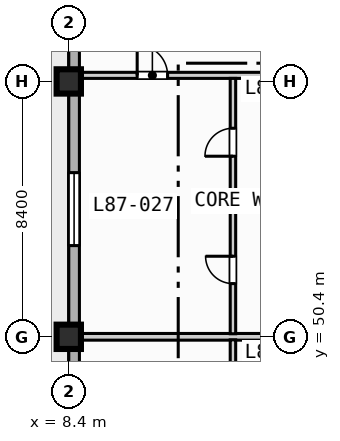
"""IFC4 building model, lengths in metres.
Left out: names, types, materials, properties, quantities, classifications, styles, units other than length and angle.
Written with IfcOpenShell. Run it as: python <this file> out.ifc"""

import sys

from ifc_helpers import new_model, si_unit, direction, frame, frame_2d, origin, origin_2d, place, context, subcontext, project, spatial, rectangle, extrude, element, fill, save


model = new_model("IFC4")
c1 = context("Model", 3, precision=1e-05, world=origin(), true_north=direction((0.0, 1.0)))
c2 = subcontext(c1, "Body", "Model", "MODEL_VIEW")
j1 = project(units=[si_unit("LENGTHUNIT", "METRE"), si_unit("PLANEANGLEUNIT", "RADIAN")], contexts=[c1])
p1 = place(None, origin())
s1 = spatial("IfcSite", under=j1, at=p1, CompositionType="ELEMENT")
p2 = place(p1, origin())
s2 = spatial("IfcBuilding", under=s1, at=p2, CompositionType="ELEMENT")
p3 = place(p2, frame((0.0, 0.0, 351.5)))
s3 = spatial("IfcBuildingStorey", under=s2, at=p3, CompositionType="ELEMENT", Elevation=351.5)
for number, where, z_axis, x_axis in (
    (1, (8.4, 50.4, 0.0), (0.0, 0.0, 1.0), (1.0, 0.0, 0.0)),
    (2, (8.4, 58.8, 0.0), (0.0, 0.0, 1.0), (1.0, 0.0, 0.0)),
):
    element("IfcColumn", number, at=place(p3, frame(where, z_axis=z_axis, x_axis=x_axis)), inside=s3, PredefinedType="COLUMN", context=c2, shape_type="SweptSolid", body=[
        extrude(rectangle(XDim=0.8, YDim=0.8, at=origin_2d()), origin(), (0.0, 0.0, 1.0), 3.9),
    ])
p4 = place(p3, frame((8.575, 11.575, 0.0), z_axis=(0.0, 0.0, 1.0), x_axis=(0.0, 1.0, 0.0)))
e3 = element("IfcWall", 3, at=p4, inside=s3, PredefinedType="STANDARD", context=c2, shape_type="SweptSolid", body=[
    extrude(rectangle(XDim=60.85, YDim=0.35, at=frame_2d((30.425, 0.0))), origin(), (0.0, 0.0, 1.0), 3.67),
])
p5 = place(p4, frame((33.925, 0.0, 0.0)))
e4 = element("IfcOpeningElement", 4, at=p5, cuts=e3, PredefinedType="OPENING", context=c2, shape_type="SweptSolid", body=[
    extrude(rectangle(XDim=1.4, YDim=2.2, at=frame_2d((0.7, 1.1))), frame((0.0, 0.185, 0.0), z_axis=(0.0, -1.0, 0.0), x_axis=(1.0, 0.0, 0.0)), (0.0, 0.0, 1.0), 0.37),
])
p6 = place(p4, frame((16.925, 0.0, 0.85)))
e5 = element("IfcOpeningElement", 5, at=p6, cuts=e3, PredefinedType="OPENING", context=c2, shape_type="SweptSolid", body=[
    extrude(rectangle(XDim=1.8, YDim=1.8, at=frame_2d((0.9, 0.9))), frame((0.0, 0.185, 0.0), z_axis=(0.0, -1.0, 0.0), x_axis=(1.0, 0.0, 0.0)), (0.0, 0.0, 1.0), 0.37),
])
p7 = place(p4, frame((25.025, 0.0, 0.85)))
e6 = element("IfcOpeningElement", 6, at=p7, cuts=e3, PredefinedType="OPENING", context=c2, shape_type="SweptSolid", body=[
    extrude(rectangle(XDim=2.4, YDim=1.95, at=frame_2d((1.2, 0.975))), frame((0.0, 0.185, 0.0), z_axis=(0.0, -1.0, 0.0), x_axis=(1.0, 0.0, 0.0)), (0.0, 0.0, 1.0), 0.37),
])
p8 = place(p4, frame((41.825, 0.0, 0.85)))
e7 = element("IfcOpeningElement", 7, at=p8, cuts=e3, PredefinedType="OPENING", context=c2, shape_type="SweptSolid", body=[
    extrude(rectangle(XDim=2.4, YDim=1.95, at=frame_2d((1.2, 0.975))), frame((0.0, 0.185, 0.0), z_axis=(0.0, -1.0, 0.0), x_axis=(1.0, 0.0, 0.0)), (0.0, 0.0, 1.0), 0.37),
])
p9 = place(p3, frame((8.65, 59.0, 0.0), z_axis=(0.0, 0.0, 1.0), x_axis=(1.0, 0.0, 0.0)))
e8 = element("IfcWall", 8, at=p9, inside=s3, PredefinedType="PARTITIONING", context=c2, shape_type="SweptSolid", body=[
    extrude(rectangle(XDim=7.95, YDim=0.2, at=frame_2d((3.975, 0.0))), origin(), (0.0, 0.0, 1.0), 3.127),
])
p10 = place(p9, frame((2.0, 0.0, 0.0)))
e9 = element("IfcOpeningElement", 9, at=p10, cuts=e8, PredefinedType="OPENING", context=c2, shape_type="SweptSolid", body=[
    extrude(rectangle(XDim=1.0, YDim=2.15, at=frame_2d((0.5, 1.075))), frame((0.0, 0.11, 0.0), z_axis=(0.0, -1.0, 0.0), x_axis=(1.0, 0.0, 0.0)), (0.0, 0.0, 1.0), 0.22),
])
p11 = place(p3, frame((8.65, 50.4, 0.0), z_axis=(0.0, 0.0, 1.0), x_axis=(1.0, 0.0, 0.0)))
e10 = element("IfcWall", 10, at=p11, inside=s3, PredefinedType="PARTITIONING", context=c2, shape_type="SweptSolid", body=[
    extrude(rectangle(XDim=7.95, YDim=0.22, at=frame_2d((3.975, 0.0))), origin(), (0.0, 0.0, 1.0), 3.07),
])
p12 = place(p3, frame((13.8, 41.7, 0.0), z_axis=(0.0, 0.0, 1.0), x_axis=(0.0, 1.0, 0.0)))
e11 = element("IfcWall", 11, at=p12, inside=s3, PredefinedType="PLUMBINGWALL", context=c2, shape_type="SweptSolid", body=[
    extrude(rectangle(XDim=8.6, YDim=0.18, at=frame_2d((4.3, 0.0))), origin(), (0.0, 0.0, 1.0), 3.67),
])
p13 = place(p12, frame((1.7, 0.0, 0.0)))
e12 = element("IfcOpeningElement", 12, at=p13, cuts=e11, PredefinedType="OPENING", context=c2, shape_type="SweptSolid", body=[
    extrude(rectangle(XDim=0.9, YDim=2.1, at=frame_2d((0.45, 1.05))), frame((0.0, 0.1, 0.0), z_axis=(0.0, -1.0, 0.0), x_axis=(1.0, 0.0, 0.0)), (0.0, 0.0, 1.0), 0.2),
])
p14 = place(p12, frame((5.99, 0.0, 0.0)))
e13 = element("IfcOpeningElement", 13, at=p14, cuts=e11, PredefinedType="OPENING", context=c2, shape_type="SweptSolid", body=[
    extrude(rectangle(XDim=0.92, YDim=2.1, at=frame_2d((0.46, 1.05))), frame((0.0, 0.1, 0.0), z_axis=(0.0, -1.0, 0.0), x_axis=(1.0, 0.0, 0.0)), (0.0, 0.0, 1.0), 0.2),
])
p15 = place(p3, frame((13.8, 50.5, 0.0), z_axis=(0.0, 0.0, 1.0), x_axis=(0.0, 1.0, 0.0)))
e14 = element("IfcWall", 14, at=p15, inside=s3, PredefinedType="PLUMBINGWALL", context=c2, shape_type="SweptSolid", body=[
    extrude(rectangle(XDim=8.4, YDim=0.18, at=frame_2d((4.2, 0.0))), origin(), (0.0, 0.0, 1.0), 3.67),
])
p16 = place(p15, frame((1.65, 0.0, 0.0)))
e15 = element("IfcOpeningElement", 15, at=p16, cuts=e14, PredefinedType="OPENING", context=c2, shape_type="SweptSolid", body=[
    extrude(rectangle(XDim=0.9, YDim=2.1, at=frame_2d((0.45, 1.05))), frame((0.0, 0.1, 0.0), z_axis=(0.0, -1.0, 0.0), x_axis=(1.0, 0.0, 0.0)), (0.0, 0.0, 1.0), 0.2),
])
p17 = place(p15, frame((5.84, 0.0, 0.0)))
e16 = element("IfcOpeningElement", 16, at=p17, cuts=e14, PredefinedType="OPENING", context=c2, shape_type="SweptSolid", body=[
    extrude(rectangle(XDim=0.92, YDim=2.1, at=frame_2d((0.46, 1.05))), frame((0.0, 0.1, 0.0), z_axis=(0.0, -1.0, 0.0), x_axis=(1.0, 0.0, 0.0)), (0.0, 0.0, 1.0), 0.2),
])
p18 = place(p3, frame((13.8, 54.7, 0.0), z_axis=(0.0, 0.0, 1.0), x_axis=(1.0, 0.0, 0.0)))
e17 = element("IfcWall", 17, at=p18, inside=s3, PredefinedType="PLUMBINGWALL", context=c2, shape_type="SweptSolid", body=[
    extrude(rectangle(XDim=2.8, YDim=0.18, at=frame_2d((1.4, 0.0))), origin(), (0.0, 0.0, 1.0), 3.67),
])
p19 = place(p8, origin())
e18 = element("IfcWindow", 18, at=p19, inside=s3, PartitioningType="SINGLE_PANEL", PredefinedType="WINDOW", context=c2, shape_type="SweptSolid", body=[
    extrude(rectangle(XDim=2.4, YDim=1.95, at=frame_2d((1.2, 0.975))), frame((0.0, 0.03, 0.0), z_axis=(0.0, -1.0, 0.0), x_axis=(1.0, 0.0, 0.0)), (0.0, 0.0, 1.0), 0.06),
])
fill(e7, e18)
p20 = place(p10, origin())
e19 = element("IfcDoor", 19, at=p20, inside=s3, OperationType="SINGLE_SWING_LEFT", PredefinedType="DOOR", context=c2, shape_type="SweptSolid", body=[
    extrude(rectangle(XDim=1.0, YDim=2.15, at=frame_2d((0.5, 1.075))), frame((0.0, 0.025, 0.0), z_axis=(0.0, -1.0, 0.0), x_axis=(1.0, 0.0, 0.0)), (0.0, 0.0, 1.0), 0.05),
])
fill(e9, e19)
p21 = place(p16, origin())
e20 = element("IfcDoor", 20, at=p21, inside=s3, OperationType="SINGLE_SWING_RIGHT", PredefinedType="DOOR", context=c2, shape_type="SweptSolid", body=[
    extrude(rectangle(XDim=0.9, YDim=2.1, at=frame_2d((0.45, 1.05))), frame((0.0, 0.025, 0.0), z_axis=(0.0, -1.0, 0.0), x_axis=(1.0, 0.0, 0.0)), (0.0, 0.0, 1.0), 0.05),
])
fill(e15, e20)
p22 = place(p17, origin())
e21 = element("IfcDoor", 21, at=p22, inside=s3, OperationType="SINGLE_SWING_LEFT", PredefinedType="DOOR", context=c2, shape_type="SweptSolid", body=[
    extrude(rectangle(XDim=0.92, YDim=2.1, at=frame_2d((0.46, 1.05))), frame((0.0, 0.025, 0.0), z_axis=(0.0, -1.0, 0.0), x_axis=(1.0, 0.0, 0.0)), (0.0, 0.0, 1.0), 0.05),
])
fill(e16, e21)
save(model, sys.argv[1])
